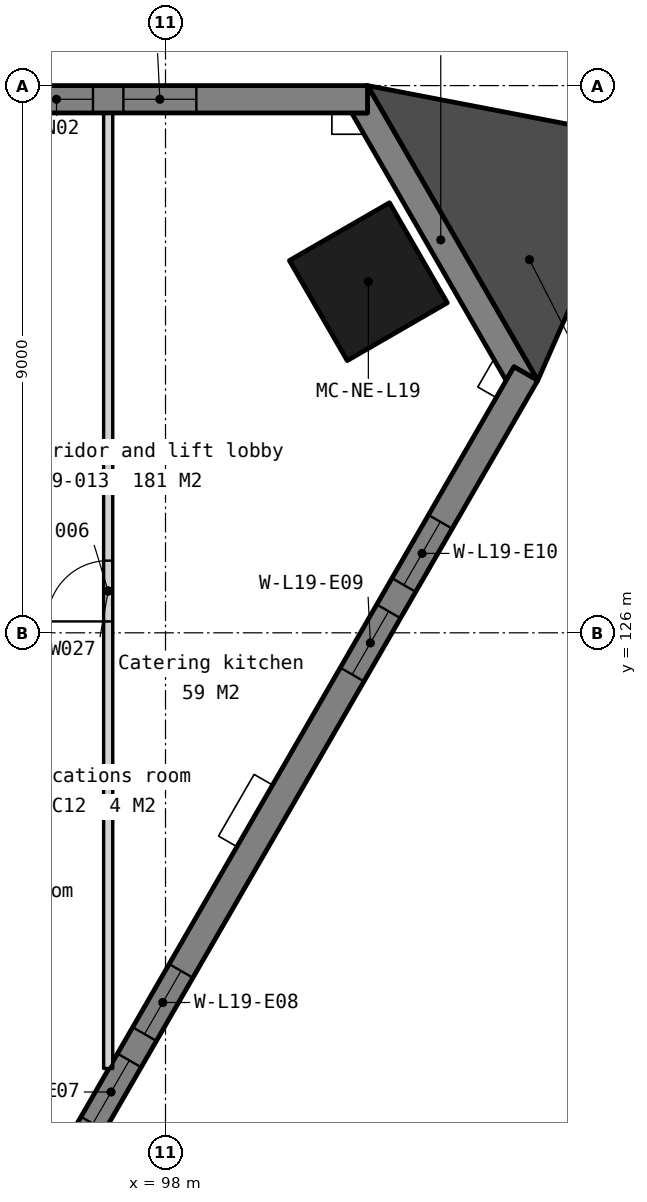
"""IFC4 building model, lengths in metres.
Left out: names, types, materials, properties, quantities, classifications, styles, units other than length and angle.
Written with IfcOpenShell. Run it as: python <this file> out.ifc"""

import sys

from ifc_helpers import new_model, si_unit, direction, frame, frame_2d, origin, origin_2d, place, context, subcontext, project, spatial, polyline, rectangle, outline, extrude, element, fill, save


model = new_model("IFC4")
c1 = context("Model", 3, precision=1e-05, world=origin(), true_north=direction((0.0, 1.0)))
c2 = subcontext(c1, "Body", "Model", "MODEL_VIEW")
j1 = project(units=[si_unit("LENGTHUNIT", "METRE"), si_unit("PLANEANGLEUNIT", "RADIAN")], contexts=[c1])
p1 = place(None, origin())
s1 = spatial("IfcSite", under=j1, at=p1, CompositionType="ELEMENT")
p2 = place(p1, origin())
s2 = spatial("IfcBuilding", under=s1, at=p2, CompositionType="ELEMENT")
p3 = place(p2, frame((0.0, 0.0, 81.8)))
s3 = spatial("IfcBuildingStorey", under=s2, at=p3, CompositionType="ELEMENT", Elevation=81.8)
p4 = place(p3, frame((101.336, 131.775, 0.0), z_axis=(0.0, 0.0, 1.0), x_axis=(-0.5, 0.866025403784, 0.0)))
e1 = element("IfcColumn", 1, at=p4, inside=s3, PredefinedType="COLUMN", context=c2, shape_type="SweptSolid", body=[
    extrude(rectangle(XDim=1.9, YDim=1.9, at=origin_2d()), origin(), (0.0, 0.0, 1.0), 3.5),
])
p5 = place(p3, frame((0.0, 0.0, -0.45)))
e2 = element("IfcWall", 2, at=p5, inside=s3, PredefinedType="SOLIDWALL", context=c2, shape_type="SweptSolid", body=[
    extrude(outline(polyline([(104.122, 130.15), (103.732, 130.375), (103.602, 130.15), (101.062, 134.55), (101.322, 134.55), (101.322, 135.0), (104.122, 130.15)])), origin(), (0.0, 0.0, 1.0), 3.8),
])
p6 = place(p3, frame((101.322, 134.775, -0.45), z_axis=(0.0, 0.0, 1.0), x_axis=(-1.0, 0.0, 0.0)))
e3 = element("IfcWall", 3, at=p6, inside=s3, PredefinedType="SOLIDWALL", context=c2, shape_type="SweptSolid", body=[
    extrude(outline(polyline([(42.643, 0.0), (42.643, 3.8), (0.0, 3.8), (0.0, 0.0), (42.643, 0.0)])), frame((0.0, 0.225, 0.0), z_axis=(0.0, -1.0, 0.0), x_axis=(1.0, 0.0, 0.0)), (0.0, 0.0, 1.0), 0.45),
])
p7 = place(p6, frame((2.814, 0.0, 1.35)))
e4 = element("IfcOpeningElement", 4, at=p7, cuts=e3, PredefinedType="OPENING", context=c2, shape_type="SweptSolid", body=[
    extrude(rectangle(XDim=1.2, YDim=1.5, at=frame_2d((0.6, 0.75))), frame((0.0, 0.235, 0.0), z_axis=(0.0, -1.0, 0.0), x_axis=(1.0, 0.0, 0.0)), (0.0, 0.0, 1.0), 0.47),
])
p8 = place(p6, frame((4.514, 0.0, 1.35)))
e5 = element("IfcOpeningElement", 5, at=p8, cuts=e3, PredefinedType="OPENING", context=c2, shape_type="SweptSolid", body=[
    extrude(rectangle(XDim=1.2, YDim=1.5, at=frame_2d((0.6, 0.75))), frame((0.0, 0.235, 0.0), z_axis=(0.0, -1.0, 0.0), x_axis=(1.0, 0.0, 0.0)), (0.0, 0.0, 1.0), 0.47),
])
p9 = place(p6, frame((11.343, 0.0, 1.35)))
e6 = element("IfcOpeningElement", 6, at=p9, cuts=e3, PredefinedType="OPENING", context=c2, shape_type="SweptSolid", body=[
    extrude(rectangle(XDim=1.2, YDim=1.5, at=frame_2d((0.6, 0.75))), frame((0.0, 0.235, 0.0), z_axis=(0.0, -1.0, 0.0), x_axis=(1.0, 0.0, 0.0)), (0.0, 0.0, 1.0), 0.47),
])
p10 = place(p6, frame((13.043, 0.0, 1.35)))
e7 = element("IfcOpeningElement", 7, at=p10, cuts=e3, PredefinedType="OPENING", context=c2, shape_type="SweptSolid", body=[
    extrude(rectangle(XDim=1.2, YDim=1.5, at=frame_2d((0.6, 0.75))), frame((0.0, 0.235, 0.0), z_axis=(0.0, -1.0, 0.0), x_axis=(1.0, 0.0, 0.0)), (0.0, 0.0, 1.0), 0.47),
])
p11 = place(p6, frame((19.872, 0.0, 1.35)))
e8 = element("IfcOpeningElement", 8, at=p11, cuts=e3, PredefinedType="OPENING", context=c2, shape_type="SweptSolid", body=[
    extrude(rectangle(XDim=1.2, YDim=1.5, at=frame_2d((0.6, 0.75))), frame((0.0, 0.235, 0.0), z_axis=(0.0, -1.0, 0.0), x_axis=(1.0, 0.0, 0.0)), (0.0, 0.0, 1.0), 0.47),
])
p12 = place(p6, frame((21.572, 0.0, 1.35)))
e9 = element("IfcOpeningElement", 9, at=p12, cuts=e3, PredefinedType="OPENING", context=c2, shape_type="SweptSolid", body=[
    extrude(rectangle(XDim=1.2, YDim=1.5, at=frame_2d((0.6, 0.75))), frame((0.0, 0.235, 0.0), z_axis=(0.0, -1.0, 0.0), x_axis=(1.0, 0.0, 0.0)), (0.0, 0.0, 1.0), 0.47),
])
p13 = place(p6, frame((28.4, 0.0, 1.35)))
e10 = element("IfcOpeningElement", 10, at=p13, cuts=e3, PredefinedType="OPENING", context=c2, shape_type="SweptSolid", body=[
    extrude(rectangle(XDim=1.2, YDim=1.5, at=frame_2d((0.6, 0.75))), frame((0.0, 0.235, 0.0), z_axis=(0.0, -1.0, 0.0), x_axis=(1.0, 0.0, 0.0)), (0.0, 0.0, 1.0), 0.47),
])
p14 = place(p6, frame((30.1, 0.0, 1.35)))
e11 = element("IfcOpeningElement", 11, at=p14, cuts=e3, PredefinedType="OPENING", context=c2, shape_type="SweptSolid", body=[
    extrude(rectangle(XDim=1.2, YDim=1.5, at=frame_2d((0.6, 0.75))), frame((0.0, 0.235, 0.0), z_axis=(0.0, -1.0, 0.0), x_axis=(1.0, 0.0, 0.0)), (0.0, 0.0, 1.0), 0.47),
])
p15 = place(p6, frame((36.929, 0.0, 1.35)))
e12 = element("IfcOpeningElement", 12, at=p15, cuts=e3, PredefinedType="OPENING", context=c2, shape_type="SweptSolid", body=[
    extrude(rectangle(XDim=1.2, YDim=1.5, at=frame_2d((0.6, 0.75))), frame((0.0, 0.235, 0.0), z_axis=(0.0, -1.0, 0.0), x_axis=(1.0, 0.0, 0.0)), (0.0, 0.0, 1.0), 0.47),
])
p16 = place(p6, frame((38.629, 0.0, 1.35)))
e13 = element("IfcOpeningElement", 13, at=p16, cuts=e3, PredefinedType="OPENING", context=c2, shape_type="SweptSolid", body=[
    extrude(rectangle(XDim=1.2, YDim=1.5, at=frame_2d((0.6, 0.75))), frame((0.0, 0.235, 0.0), z_axis=(0.0, -1.0, 0.0), x_axis=(1.0, 0.0, 0.0)), (0.0, 0.0, 1.0), 0.47),
])
p17 = place(p3, frame((82.605, 93.333, -0.45), z_axis=(0.0, 0.0, 1.0), x_axis=(0.500000478905, 0.866025127289, 0.0)))
e14 = element("IfcWall", 14, at=p17, inside=s3, PredefinedType="SOLIDWALL", context=c2, shape_type="SweptSolid", body=[
    extrude(outline(polyline([(42.643, 0.0), (42.643, 3.8), (0.0, 3.8), (0.0, 0.0), (42.643, 0.0)])), frame((0.0, 0.225, 0.0), z_axis=(0.0, -1.0, 0.0), x_axis=(1.0, 0.0, 0.0)), (0.0, 0.0, 1.0), 0.45),
])
p18 = place(p17, frame((2.814, 0.0, 1.35)))
e15 = element("IfcOpeningElement", 15, at=p18, cuts=e14, PredefinedType="OPENING", context=c2, shape_type="SweptSolid", body=[
    extrude(rectangle(XDim=1.2, YDim=1.5, at=frame_2d((0.6, 0.75))), frame((0.0, 0.235, 0.0), z_axis=(0.0, -1.0, 0.0), x_axis=(1.0, 0.0, 0.0)), (0.0, 0.0, 1.0), 0.47),
])
p19 = place(p17, frame((4.514, 0.0, 1.35)))
e16 = element("IfcOpeningElement", 16, at=p19, cuts=e14, PredefinedType="OPENING", context=c2, shape_type="SweptSolid", body=[
    extrude(rectangle(XDim=1.2, YDim=1.5, at=frame_2d((0.6, 0.75))), frame((0.0, 0.235, 0.0), z_axis=(0.0, -1.0, 0.0), x_axis=(1.0, 0.0, 0.0)), (0.0, 0.0, 1.0), 0.47),
])
p20 = place(p17, frame((11.343, 0.0, 1.35)))
e17 = element("IfcOpeningElement", 17, at=p20, cuts=e14, PredefinedType="OPENING", context=c2, shape_type="SweptSolid", body=[
    extrude(rectangle(XDim=1.2, YDim=1.5, at=frame_2d((0.6, 0.75))), frame((0.0, 0.235, 0.0), z_axis=(0.0, -1.0, 0.0), x_axis=(1.0, 0.0, 0.0)), (0.0, 0.0, 1.0), 0.47),
])
p21 = place(p17, frame((13.043, 0.0, 1.35)))
e18 = element("IfcOpeningElement", 18, at=p21, cuts=e14, PredefinedType="OPENING", context=c2, shape_type="SweptSolid", body=[
    extrude(rectangle(XDim=1.2, YDim=1.5, at=frame_2d((0.6, 0.75))), frame((0.0, 0.235, 0.0), z_axis=(0.0, -1.0, 0.0), x_axis=(1.0, 0.0, 0.0)), (0.0, 0.0, 1.0), 0.47),
])
p22 = place(p17, frame((19.872, 0.0, 1.35)))
e19 = element("IfcOpeningElement", 19, at=p22, cuts=e14, PredefinedType="OPENING", context=c2, shape_type="SweptSolid", body=[
    extrude(rectangle(XDim=1.2, YDim=1.5, at=frame_2d((0.6, 0.75))), frame((0.0, 0.235, 0.0), z_axis=(0.0, -1.0, 0.0), x_axis=(1.0, 0.0, 0.0)), (0.0, 0.0, 1.0), 0.47),
])
p23 = place(p17, frame((21.572, 0.0, 1.35)))
e20 = element("IfcOpeningElement", 20, at=p23, cuts=e14, PredefinedType="OPENING", context=c2, shape_type="SweptSolid", body=[
    extrude(rectangle(XDim=1.2, YDim=1.5, at=frame_2d((0.6, 0.75))), frame((0.0, 0.235, 0.0), z_axis=(0.0, -1.0, 0.0), x_axis=(1.0, 0.0, 0.0)), (0.0, 0.0, 1.0), 0.47),
])
p24 = place(p17, frame((28.4, 0.0, 1.35)))
e21 = element("IfcOpeningElement", 21, at=p24, cuts=e14, PredefinedType="OPENING", context=c2, shape_type="SweptSolid", body=[
    extrude(rectangle(XDim=1.2, YDim=1.5, at=frame_2d((0.6, 0.75))), frame((0.0, 0.235, 0.0), z_axis=(0.0, -1.0, 0.0), x_axis=(1.0, 0.0, 0.0)), (0.0, 0.0, 1.0), 0.47),
])
p25 = place(p17, frame((30.1, 0.0, 1.35)))
e22 = element("IfcOpeningElement", 22, at=p25, cuts=e14, PredefinedType="OPENING", context=c2, shape_type="SweptSolid", body=[
    extrude(rectangle(XDim=1.2, YDim=1.5, at=frame_2d((0.6, 0.75))), frame((0.0, 0.235, 0.0), z_axis=(0.0, -1.0, 0.0), x_axis=(1.0, 0.0, 0.0)), (0.0, 0.0, 1.0), 0.47),
])
p26 = place(p17, frame((36.929, 0.0, 1.35)))
e23 = element("IfcOpeningElement", 23, at=p26, cuts=e14, PredefinedType="OPENING", context=c2, shape_type="SweptSolid", body=[
    extrude(rectangle(XDim=1.2, YDim=1.5, at=frame_2d((0.6, 0.75))), frame((0.0, 0.235, 0.0), z_axis=(0.0, -1.0, 0.0), x_axis=(1.0, 0.0, 0.0)), (0.0, 0.0, 1.0), 0.47),
])
p27 = place(p17, frame((38.629, 0.0, 1.35)))
e24 = element("IfcOpeningElement", 24, at=p27, cuts=e14, PredefinedType="OPENING", context=c2, shape_type="SweptSolid", body=[
    extrude(rectangle(XDim=1.2, YDim=1.5, at=frame_2d((0.6, 0.75))), frame((0.0, 0.235, 0.0), z_axis=(0.0, -1.0, 0.0), x_axis=(1.0, 0.0, 0.0)), (0.0, 0.0, 1.0), 0.47),
])
p28 = place(p3, frame((0.0, 0.0, -0.45)))
e25 = element("IfcWall", 25, at=p28, inside=s3, PredefinedType="SOLIDWALL", context=c2, shape_type="SweptSolid", body=[
    extrude(outline(polyline([(104.122, 130.15), (105.871, 134.124), (101.322, 135.0), (104.122, 130.15)])), origin(), (0.0, 0.0, 1.0), 3.8),
])
p29 = place(p3, frame((97.057, 118.834, 0.0), z_axis=(0.0, 0.0, 1.0), x_axis=(0.0, 1.0, 0.0)))
e26 = element("IfcWall", 26, at=p29, inside=s3, PredefinedType="PARTITIONING", context=c2, shape_type="SweptSolid", body=[
    extrude(rectangle(XDim=15.706, YDim=0.15, at=frame_2d((7.853, 0.0))), origin(), (0.0, 0.0, 1.0), 3.35),
])
p30 = place(p29, frame((7.353, 0.0, 0.0)))
e27 = element("IfcOpeningElement", 27, at=p30, cuts=e26, PredefinedType="OPENING", context=c2, shape_type="SweptSolid", body=[
    extrude(rectangle(XDim=1.0, YDim=2.1, at=frame_2d((0.5, 1.05))), frame((0.0, 0.085, 0.0), z_axis=(0.0, -1.0, 0.0), x_axis=(1.0, 0.0, 0.0)), (0.0, 0.0, 1.0), 0.17),
])
p31 = place(p7, origin())
e28 = element("IfcWindow", 28, at=p31, inside=s3, PartitioningType="SINGLE_PANEL", PredefinedType="WINDOW", context=c2, shape_type="SweptSolid", body=[
    extrude(rectangle(XDim=1.2, YDim=1.5, at=frame_2d((0.6, 0.75))), frame((0.0, 0.03, 0.0), z_axis=(0.0, -1.0, 0.0), x_axis=(1.0, 0.0, 0.0)), (0.0, 0.0, 1.0), 0.06),
])
fill(e4, e28)
p32 = place(p8, origin())
e29 = element("IfcWindow", 29, at=p32, inside=s3, PartitioningType="SINGLE_PANEL", PredefinedType="WINDOW", context=c2, shape_type="SweptSolid", body=[
    extrude(rectangle(XDim=1.2, YDim=1.5, at=frame_2d((0.6, 0.75))), frame((0.0, 0.03, 0.0), z_axis=(0.0, -1.0, 0.0), x_axis=(1.0, 0.0, 0.0)), (0.0, 0.0, 1.0), 0.06),
])
fill(e5, e29)
p33 = place(p24, origin())
e30 = element("IfcWindow", 30, at=p33, inside=s3, PartitioningType="SINGLE_PANEL", PredefinedType="WINDOW", context=c2, shape_type="SweptSolid", body=[
    extrude(rectangle(XDim=1.2, YDim=1.5, at=frame_2d((0.6, 0.75))), frame((0.0, 0.03, 0.0), z_axis=(0.0, -1.0, 0.0), x_axis=(1.0, 0.0, 0.0)), (0.0, 0.0, 1.0), 0.06),
])
fill(e21, e30)
p34 = place(p25, origin())
e31 = element("IfcWindow", 31, at=p34, inside=s3, PartitioningType="SINGLE_PANEL", PredefinedType="WINDOW", context=c2, shape_type="SweptSolid", body=[
    extrude(rectangle(XDim=1.2, YDim=1.5, at=frame_2d((0.6, 0.75))), frame((0.0, 0.03, 0.0), z_axis=(0.0, -1.0, 0.0), x_axis=(1.0, 0.0, 0.0)), (0.0, 0.0, 1.0), 0.06),
])
fill(e22, e31)
p35 = place(p26, origin())
e32 = element("IfcWindow", 32, at=p35, inside=s3, PartitioningType="SINGLE_PANEL", PredefinedType="WINDOW", context=c2, shape_type="SweptSolid", body=[
    extrude(rectangle(XDim=1.2, YDim=1.5, at=frame_2d((0.6, 0.75))), frame((0.0, 0.03, 0.0), z_axis=(0.0, -1.0, 0.0), x_axis=(1.0, 0.0, 0.0)), (0.0, 0.0, 1.0), 0.06),
])
fill(e23, e32)
p36 = place(p27, origin())
e33 = element("IfcWindow", 33, at=p36, inside=s3, PartitioningType="SINGLE_PANEL", PredefinedType="WINDOW", context=c2, shape_type="SweptSolid", body=[
    extrude(rectangle(XDim=1.2, YDim=1.5, at=frame_2d((0.6, 0.75))), frame((0.0, 0.03, 0.0), z_axis=(0.0, -1.0, 0.0), x_axis=(1.0, 0.0, 0.0)), (0.0, 0.0, 1.0), 0.06),
])
fill(e24, e33)
p37 = place(p30, origin())
e34 = element("IfcDoor", 34, at=p37, inside=s3, OperationType="SINGLE_SWING_LEFT", PredefinedType="DOOR", context=c2, shape_type="SweptSolid", body=[
    extrude(rectangle(XDim=1.0, YDim=2.1, at=frame_2d((0.5, 1.05))), frame((0.0, 0.025, 0.0), z_axis=(0.0, -1.0, 0.0), x_axis=(1.0, 0.0, 0.0)), (0.0, 0.0, 1.0), 0.05),
])
fill(e27, e34)
save(model, sys.argv[1])
